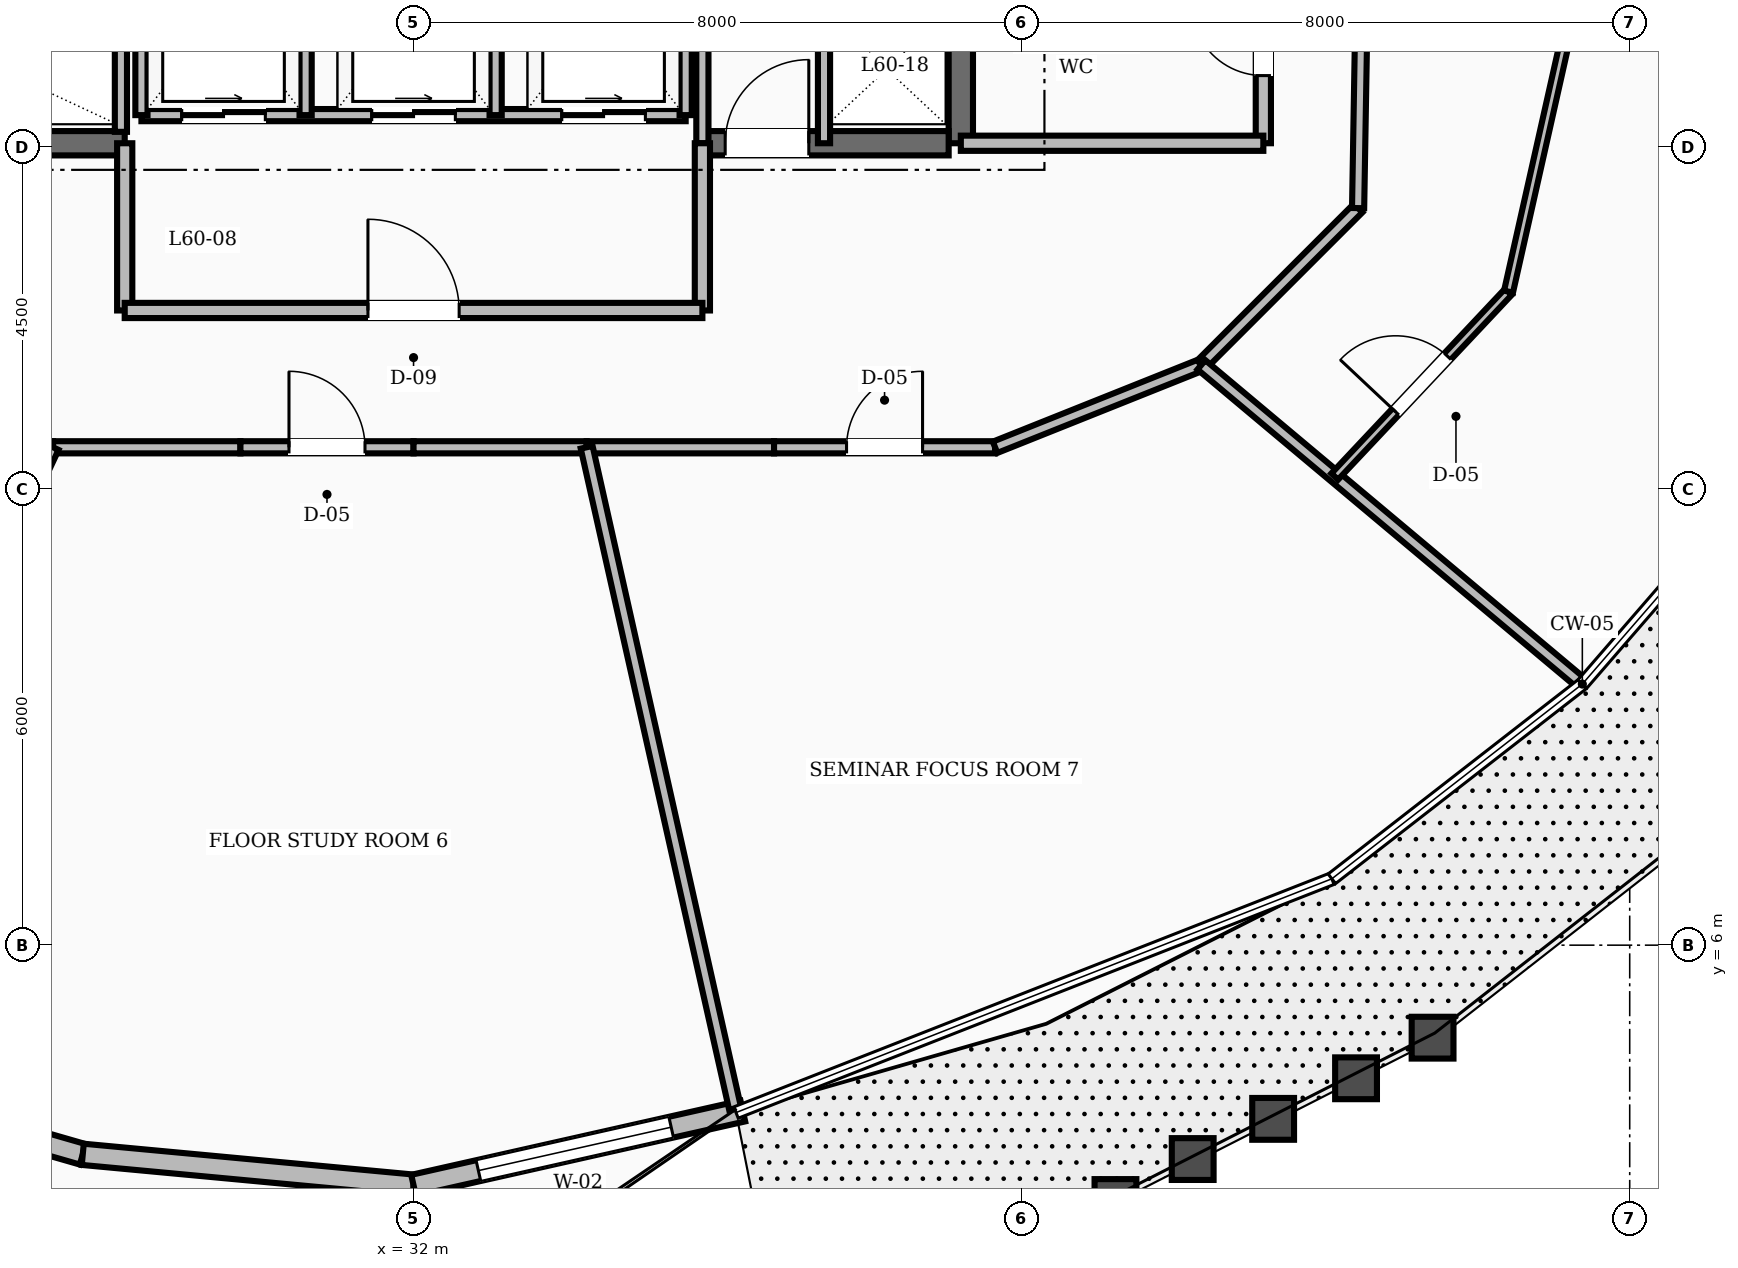
"""IFC4 building model, lengths in metres.
Left out: names, types, materials, properties, quantities, classifications, styles, units other than length and angle.
Written with IfcOpenShell. Run it as: python <this file> out.ifc"""

import sys

from ifc_helpers import new_model, si_unit, direction, frame, frame_2d, origin, place, context, subcontext, project, spatial, rectangle, extrude, element, fill, save


model = new_model("IFC4")
c1 = context("Model", 3, precision=1e-05, world=origin(), true_north=direction((0.0, 1.0)))
c2 = subcontext(c1, "Body", "Model", "MODEL_VIEW")
j1 = project(units=[si_unit("LENGTHUNIT", "METRE"), si_unit("PLANEANGLEUNIT", "RADIAN")], contexts=[c1])
p1 = place(None, origin())
s1 = spatial("IfcSite", under=j1, at=p1, CompositionType="ELEMENT")
p2 = place(p1, origin())
s2 = spatial("IfcBuilding", under=s1, at=p2, CompositionType="ELEMENT")
p3 = place(p2, frame((0.0, 0.0, 232.8)))
s3 = spatial("IfcBuildingStorey", under=s2, at=p3, CompositionType="ELEMENT", Elevation=232.8)
p4 = place(p3, frame((39.2, 16.55, 0.0), z_axis=(0.0, 0.0, 1.0), x_axis=(0.0, 1.0, 0.0)))
e1 = element("IfcWall", 1, at=p4, inside=s3, PredefinedType="SHEAR", context=c2, shape_type="SweptSolid", body=[
    extrude(rectangle(XDim=6.3, YDim=0.32, at=frame_2d((3.15, 0.0))), origin(), (0.0, 0.0, 1.0), 3.6),
])
p5 = place(p3, frame((24.96, 16.55, 0.0), z_axis=(0.0, 0.0, 1.0), x_axis=(1.0, 0.0, 0.0)))
e2 = element("IfcWall", 2, at=p5, inside=s3, PredefinedType="SHEAR", context=c2, shape_type="SweptSolid", body=[
    extrude(rectangle(XDim=3.24, YDim=0.32, at=frame_2d((1.62, 0.0))), origin(), (0.0, 0.0, 1.0), 3.6),
])
p6 = place(p3, frame((35.8, 16.55, 0.0), z_axis=(0.0, 0.0, 1.0), x_axis=(1.0, 0.0, 0.0)))
e3 = element("IfcWall", 3, at=p6, inside=s3, PredefinedType="SHEAR", context=c2, shape_type="SweptSolid", body=[
    extrude(rectangle(XDim=3.24, YDim=0.32, at=frame_2d((1.62, 0.0))), origin(), (0.0, 0.0, 1.0), 3.6),
])
p7 = place(p6, frame((0.3, 0.0, 0.0)))
e4 = element("IfcOpeningElement", 4, at=p7, cuts=e3, PredefinedType="OPENING", context=c2, shape_type="SweptSolid", body=[
    extrude(rectangle(XDim=1.1, YDim=2.1, at=frame_2d((0.55, 1.05))), frame((0.0, 0.17, 0.0), z_axis=(0.0, -1.0, 0.0), x_axis=(1.0, 0.0, 0.0)), (0.0, 0.0, 1.0), 0.34),
])
p8 = place(p3, frame((23.464, 4.452, 0.0), z_axis=(0.0, 0.0, 1.0), x_axis=(0.961001713186, -0.276542414927, 0.0)))
e5 = element("IfcWall", 5, at=p8, inside=s3, PredefinedType="STANDARD", context=c2, shape_type="SweptSolid", body=[
    extrude(rectangle(XDim=4.354, YDim=0.28, at=frame_2d((2.177, 0.0))), origin(), (0.0, 0.0, 1.0), 2.88),
])
p9 = place(p3, frame((27.648, 3.248, 0.0), z_axis=(0.0, 0.0, 1.0), x_axis=(0.995665801827, -0.093003285276, 0.0)))
e6 = element("IfcWall", 6, at=p9, inside=s3, PredefinedType="STANDARD", context=c2, shape_type="SweptSolid", body=[
    extrude(rectangle(XDim=4.371, YDim=0.28, at=frame_2d((2.186, 0.0))), origin(), (0.0, 0.0, 1.0), 2.88),
])
p10 = place(p3, frame((32.0, 2.842, 0.0), z_axis=(0.0, 0.0, 1.0), x_axis=(0.975546432827, 0.219793442572, 0.0)))
e7 = element("IfcWall", 7, at=p10, inside=s3, PredefinedType="STANDARD", context=c2, shape_type="SweptSolid", body=[
    extrude(rectangle(XDim=4.441, YDim=0.28, at=frame_2d((2.22, 0.0))), origin(), (0.0, 0.0, 1.0), 2.88),
])
p11 = place(p10, frame((0.875, 0.0, 0.8)))
e8 = element("IfcOpeningElement", 8, at=p11, cuts=e7, PredefinedType="OPENING", context=c2, shape_type="SweptSolid", body=[
    extrude(rectangle(XDim=2.6, YDim=1.65, at=frame_2d((1.3, 0.825))), frame((0.0, 0.15, 0.0), z_axis=(0.0, -1.0, 0.0), x_axis=(1.0, 0.0, 0.0)), (0.0, 0.0, 1.0), 0.3),
])
p12 = place(p3, frame((43.18, 16.55, 0.0), z_axis=(0.0, 0.0, 1.0), x_axis=(0.0, 1.0, 0.0)))
e9 = element("IfcWall", 9, at=p12, inside=s3, PredefinedType="SOLIDWALL", context=c2, shape_type="SweptSolid", body=[
    extrude(rectangle(XDim=2.73, YDim=0.2, at=frame_2d((1.365, 0.0))), origin(), (0.0, 0.0, 1.0), 2.87),
])
p13 = place(p12, frame((0.89, 0.0, 0.0)))
e10 = element("IfcOpeningElement", 10, at=p13, cuts=e9, PredefinedType="OPENING", context=c2, shape_type="SweptSolid", body=[
    extrude(rectangle(XDim=0.95, YDim=2.1, at=frame_2d((0.475, 1.05))), frame((0.0, 0.11, 0.0), z_axis=(0.0, -1.0, 0.0), x_axis=(1.0, 0.0, 0.0)), (0.0, 0.0, 1.0), 0.22),
])
p14 = place(p3, frame((39.2, 16.55, 0.0), z_axis=(0.0, 0.0, 1.0), x_axis=(1.0, 0.0, 0.0)))
e11 = element("IfcWall", 11, at=p14, inside=s3, PredefinedType="SOLIDWALL", context=c2, shape_type="SweptSolid", body=[
    extrude(rectangle(XDim=3.98, YDim=0.2, at=frame_2d((1.99, 0.0))), origin(), (0.0, 0.0, 1.0), 2.87),
])
p15 = place(p3, frame((35.8, 16.55, 0.0), z_axis=(0.0, 0.0, 1.0), x_axis=(0.0, 1.0, 0.0)))
e12 = element("IfcWall", 12, at=p15, inside=s3, PredefinedType="SOLIDWALL", context=c2, shape_type="SweptSolid", body=[
    extrude(rectangle(XDim=3.3, YDim=0.16, at=frame_2d((1.65, 0.0))), origin(), (0.0, 0.0, 1.0), 2.87),
])
p16 = place(p3, frame((37.4, 16.55, 0.0), z_axis=(0.0, 0.0, 1.0), x_axis=(0.0, 1.0, 0.0)))
e13 = element("IfcWall", 13, at=p16, inside=s3, PredefinedType="SOLIDWALL", context=c2, shape_type="SweptSolid", body=[
    extrude(rectangle(XDim=1.75, YDim=0.16, at=frame_2d((0.875, 0.0))), origin(), (0.0, 0.0, 1.0), 2.87),
])
for number, where, z_axis, x_axis in (
    (14, (28.2, 14.35, 0.0), (0.0, 0.0, 1.0), (0.0, 1.0, 0.0)),
    (15, (35.8, 14.35, 0.0), (0.0, 0.0, 1.0), (0.0, 1.0, 0.0)),
):
    element("IfcWall", number, at=place(p3, frame(where, z_axis=z_axis, x_axis=x_axis)), inside=s3, PredefinedType="SOLIDWALL", context=c2, shape_type="SweptSolid", body=[
        extrude(rectangle(XDim=2.2, YDim=0.2, at=frame_2d((1.1, 0.0))), origin(), (0.0, 0.0, 1.0), 2.87),
    ])
p17 = place(p3, frame((28.2, 14.35, 0.0), z_axis=(0.0, 0.0, 1.0), x_axis=(1.0, 0.0, 0.0)))
e16 = element("IfcWall", 16, at=p17, inside=s3, PredefinedType="SOLIDWALL", context=c2, shape_type="SweptSolid", body=[
    extrude(rectangle(XDim=7.6, YDim=0.2, at=frame_2d((3.8, 0.0))), origin(), (0.0, 0.0, 1.0), 2.87),
])
p18 = place(p17, frame((3.2, 0.0, 0.0)))
e17 = element("IfcOpeningElement", 17, at=p18, cuts=e16, PredefinedType="OPENING", context=c2, shape_type="SweptSolid", body=[
    extrude(rectangle(XDim=1.2, YDim=2.1, at=frame_2d((0.6, 1.05))), frame((0.0, 0.11, 0.0), z_axis=(0.0, -1.0, 0.0), x_axis=(1.0, 0.0, 0.0)), (0.0, 0.0, 1.0), 0.22),
])
p19 = place(p3, frame((28.42, 16.92, 0.0), z_axis=(0.0, 0.0, 1.0), x_axis=(1.0, 0.0, 0.0)))
e18 = element("IfcWall", 18, at=p19, inside=s3, PredefinedType="SOLIDWALL", context=c2, shape_type="SweptSolid", body=[
    extrude(rectangle(XDim=7.16, YDim=0.16, at=frame_2d((3.58, 0.0))), origin(), (0.0, 0.0, 1.0), 2.87),
])
p20 = place(p19, frame((0.53, 0.0, 0.0)))
e19 = element("IfcOpeningElement", 19, at=p20, cuts=e18, PredefinedType="OPENING", context=c2, shape_type="SweptSolid", body=[
    extrude(rectangle(XDim=1.1, YDim=2.15, at=frame_2d((0.55, 1.075))), frame((0.0, 0.09, 0.0), z_axis=(0.0, -1.0, 0.0), x_axis=(1.0, 0.0, 0.0)), (0.0, 0.0, 1.0), 0.18),
])
p21 = place(p19, frame((3.03, 0.0, 0.0)))
e20 = element("IfcOpeningElement", 20, at=p21, cuts=e18, PredefinedType="OPENING", context=c2, shape_type="SweptSolid", body=[
    extrude(rectangle(XDim=1.1, YDim=2.15, at=frame_2d((0.55, 1.075))), frame((0.0, 0.09, 0.0), z_axis=(0.0, -1.0, 0.0), x_axis=(1.0, 0.0, 0.0)), (0.0, 0.0, 1.0), 0.18),
])
p22 = place(p19, frame((5.53, 0.0, 0.0)))
e21 = element("IfcOpeningElement", 21, at=p22, cuts=e18, PredefinedType="OPENING", context=c2, shape_type="SweptSolid", body=[
    extrude(rectangle(XDim=1.1, YDim=2.15, at=frame_2d((0.55, 1.075))), frame((0.0, 0.09, 0.0), z_axis=(0.0, -1.0, 0.0), x_axis=(1.0, 0.0, 0.0)), (0.0, 0.0, 1.0), 0.18),
])
for number, where, z_axis, x_axis in (
    (22, (28.42, 16.92, 0.0), (0.0, 0.0, 1.0), (0.0, 1.0, 0.0)),
    (23, (30.58, 16.92, 0.0), (0.0, 0.0, 1.0), (0.0, 1.0, 0.0)),
    (24, (33.08, 16.92, 0.0), (0.0, 0.0, 1.0), (0.0, 1.0, 0.0)),
    (25, (35.58, 16.92, 0.0), (0.0, 0.0, 1.0), (0.0, 1.0, 0.0)),
):
    element("IfcWall", number, at=place(p3, frame(where, z_axis=z_axis, x_axis=x_axis)), inside=s3, PredefinedType="SOLIDWALL", context=c2, shape_type="SweptSolid", body=[
        extrude(rectangle(XDim=2.76, YDim=0.16, at=frame_2d((1.38, 0.0))), origin(), (0.0, 0.0, 1.0), 2.87),
    ])
p23 = place(p3, frame((28.15, 16.7, 0.0), z_axis=(0.0, 0.0, 1.0), x_axis=(0.0, 1.0, 0.0)))
e26 = element("IfcWall", 26, at=p23, inside=s3, PredefinedType="SOLIDWALL", context=c2, shape_type="SweptSolid", body=[
    extrude(rectangle(XDim=6.05, YDim=0.16, at=frame_2d((3.025, 0.0))), origin(), (0.0, 0.0, 1.0), 2.87),
])
p24 = place(p3, frame((24.349, 12.55, 0.0), z_axis=(0.0, 0.0, 1.0), x_axis=(1.0, 0.0, 0.0)))
e27 = element("IfcWall", 27, at=p24, inside=s3, PredefinedType="SOLIDWALL", context=c2, shape_type="SweptSolid", body=[
    extrude(rectangle(XDim=2.908, YDim=0.16, at=frame_2d((1.454, 0.0))), origin(), (0.0, 0.0, 1.0), 2.87),
])
p25 = place(p3, frame((27.257, 12.55, 0.0), z_axis=(0.0, 0.0, 1.0), x_axis=(1.0, 0.0, 0.0)))
e28 = element("IfcWall", 28, at=p25, inside=s3, PredefinedType="SOLIDWALL", context=c2, shape_type="SweptSolid", body=[
    extrude(rectangle(XDim=2.465, YDim=0.16, at=frame_2d((1.232, 0.0))), origin(), (0.0, 0.0, 1.0), 2.87),
])
p26 = place(p3, frame((29.722, 12.55, 0.0), z_axis=(0.0, 0.0, 1.0), x_axis=(1.0, 0.0, 0.0)))
e29 = element("IfcWall", 29, at=p26, inside=s3, PredefinedType="SOLIDWALL", context=c2, shape_type="SweptSolid", body=[
    extrude(rectangle(XDim=2.278, YDim=0.16, at=frame_2d((1.139, 0.0))), origin(), (0.0, 0.0, 1.0), 2.87),
])
p27 = place(p26, frame((0.639, 0.0, 0.0)))
e30 = element("IfcOpeningElement", 30, at=p27, cuts=e29, PredefinedType="OPENING", context=c2, shape_type="SweptSolid", body=[
    extrude(rectangle(XDim=1.0, YDim=2.1, at=frame_2d((0.5, 1.05))), frame((0.0, 0.09, 0.0), z_axis=(0.0, -1.0, 0.0), x_axis=(1.0, 0.0, 0.0)), (0.0, 0.0, 1.0), 0.18),
])
p28 = place(p3, frame((32.0, 12.55, 0.0), z_axis=(0.0, 0.0, 1.0), x_axis=(1.0, 0.0, 0.0)))
e31 = element("IfcWall", 31, at=p28, inside=s3, PredefinedType="SOLIDWALL", context=c2, shape_type="SweptSolid", body=[
    extrude(rectangle(XDim=2.278, YDim=0.16, at=frame_2d((1.139, 0.0))), origin(), (0.0, 0.0, 1.0), 2.87),
])
p29 = place(p3, frame((34.278, 12.55, 0.0), z_axis=(0.0, 0.0, 1.0), x_axis=(1.0, 0.0, 0.0)))
e32 = element("IfcWall", 32, at=p29, inside=s3, PredefinedType="SOLIDWALL", context=c2, shape_type="SweptSolid", body=[
    extrude(rectangle(XDim=2.465, YDim=0.16, at=frame_2d((1.232, 0.0))), origin(), (0.0, 0.0, 1.0), 2.87),
])
p30 = place(p3, frame((36.743, 12.55, 0.0), z_axis=(0.0, 0.0, 1.0), x_axis=(1.0, 0.0, 0.0)))
e33 = element("IfcWall", 33, at=p30, inside=s3, PredefinedType="SOLIDWALL", context=c2, shape_type="SweptSolid", body=[
    extrude(rectangle(XDim=2.908, YDim=0.16, at=frame_2d((1.454, 0.0))), origin(), (0.0, 0.0, 1.0), 2.87),
])
p31 = place(p30, frame((0.954, 0.0, 0.0)))
e34 = element("IfcOpeningElement", 34, at=p31, cuts=e33, PredefinedType="OPENING", context=c2, shape_type="SweptSolid", body=[
    extrude(rectangle(XDim=1.0, YDim=2.1, at=frame_2d((0.5, 1.05))), frame((0.0, 0.09, 0.0), z_axis=(0.0, -1.0, 0.0), x_axis=(1.0, 0.0, 0.0)), (0.0, 0.0, 1.0), 0.18),
])
p32 = place(p3, frame((39.651, 12.55, 0.0), z_axis=(0.0, 0.0, 1.0), x_axis=(0.92856882165, 0.371160266542, 0.0)))
e35 = element("IfcWall", 35, at=p32, inside=s3, PredefinedType="SOLIDWALL", context=c2, shape_type="SweptSolid", body=[
    extrude(rectangle(XDim=2.923, YDim=0.16, at=frame_2d((1.461, 0.0))), origin(), (0.0, 0.0, 1.0), 2.87),
])
p33 = place(p3, frame((42.365, 13.635, 0.0), z_axis=(0.0, 0.0, 1.0), x_axis=(0.707106781187, 0.707106781187, 0.0)))
e36 = element("IfcWall", 36, at=p33, inside=s3, PredefinedType="SOLIDWALL", context=c2, shape_type="SweptSolid", body=[
    extrude(rectangle(XDim=2.916, YDim=0.16, at=frame_2d((1.458, 0.0))), origin(), (0.0, 0.0, 1.0), 2.87),
])
p34 = place(p3, frame((44.427, 15.697, 0.0), z_axis=(0.0, 0.0, 1.0), x_axis=(0.016981035134, 0.999855811828, 0.0)))
e37 = element("IfcWall", 37, at=p34, inside=s3, PredefinedType="SOLIDWALL", context=c2, shape_type="SweptSolid", body=[
    extrude(rectangle(XDim=3.134, YDim=0.16, at=frame_2d((1.567, 0.0))), origin(), (0.0, 0.0, 1.0), 2.87),
])
p35 = place(p3, frame((42.365, 13.635, 0.0), z_axis=(0.0, 0.0, 1.0), x_axis=(0.766438880931, -0.642317243889, 0.0)))
e38 = element("IfcWall", 38, at=p35, inside=s3, PredefinedType="SOLIDWALL", context=c2, shape_type="SweptSolid", body=[
    extrude(rectangle(XDim=6.489, YDim=0.16, at=frame_2d((3.245, 0.0))), origin(), (0.0, 0.0, 1.0), 2.87),
])
p36 = place(p3, frame((44.119, 12.165, 0.0), z_axis=(0.0, 0.0, 1.0), x_axis=(0.684903797097, 0.728633507823, 0.0)))
e39 = element("IfcWall", 39, at=p36, inside=s3, PredefinedType="PARTITIONING", context=c2, shape_type="SweptSolid", body=[
    extrude(rectangle(XDim=3.339, YDim=0.12, at=frame_2d((1.669, 0.0))), origin(), (0.0, 0.0, 1.0), 2.87),
])
p37 = place(p36, frame((1.169, 0.0, 0.0)))
e40 = element("IfcOpeningElement", 40, at=p37, cuts=e39, PredefinedType="OPENING", context=c2, shape_type="SweptSolid", body=[
    extrude(rectangle(XDim=1.0, YDim=2.1, at=frame_2d((0.5, 1.05))), frame((0.0, 0.07, 0.0), z_axis=(0.0, -1.0, 0.0), x_axis=(1.0, 0.0, 0.0)), (0.0, 0.0, 1.0), 0.14),
])
p38 = place(p3, frame((46.406, 14.598, 0.0), z_axis=(0.0, 0.0, 1.0), x_axis=(0.219303315939, 0.975656730422, 0.0)))
e41 = element("IfcWall", 41, at=p38, inside=s3, PredefinedType="PARTITIONING", context=c2, shape_type="SweptSolid", body=[
    extrude(rectangle(XDim=3.365, YDim=0.12, at=frame_2d((1.683, 0.0))), origin(), (0.0, 0.0, 1.0), 2.87),
])
p39 = place(p3, frame((27.257, 12.55, 0.0), z_axis=(0.0, 0.0, 1.0), x_axis=(-0.424224240042, -0.905557173325, 0.0)))
e42 = element("IfcWall", 42, at=p39, inside=s3, PredefinedType="SOLIDWALL", context=c2, shape_type="SweptSolid", body=[
    extrude(rectangle(XDim=8.892, YDim=0.16, at=frame_2d((4.446, 0.0))), origin(), (0.0, 0.0, 1.0), 2.87),
])
p40 = place(p3, frame((34.278, 12.55, 0.0), z_axis=(0.0, 0.0, 1.0), x_axis=(0.219036747028, -0.975716610216, 0.0)))
e43 = element("IfcWall", 43, at=p40, inside=s3, PredefinedType="SOLIDWALL", context=c2, shape_type="SweptSolid", body=[
    extrude(rectangle(XDim=8.92, YDim=0.16, at=frame_2d((4.46, 0.0))), origin(), (0.0, 0.0, 1.0), 2.87),
])
p41 = place(p11, origin())
e44 = element("IfcWindow", 44, at=p41, inside=s3, PartitioningType="SINGLE_PANEL", PredefinedType="WINDOW", context=c2, shape_type="SweptSolid", body=[
    extrude(rectangle(XDim=2.6, YDim=1.65, at=frame_2d((1.3, 0.825))), frame((0.0, 0.03, 0.0), z_axis=(0.0, -1.0, 0.0), x_axis=(1.0, 0.0, 0.0)), (0.0, 0.0, 1.0), 0.06),
])
fill(e8, e44)
p42 = place(p13, origin())
e45 = element("IfcDoor", 45, at=p42, inside=s3, OperationType="SINGLE_SWING_RIGHT", PredefinedType="DOOR", context=c2, shape_type="SweptSolid", body=[
    extrude(rectangle(XDim=0.95, YDim=2.1, at=frame_2d((0.475, 1.05))), frame((0.0, 0.025, 0.0), z_axis=(0.0, -1.0, 0.0), x_axis=(1.0, 0.0, 0.0)), (0.0, 0.0, 1.0), 0.05),
])
fill(e10, e45)
p43 = place(p7, origin())
e46 = element("IfcDoor", 46, at=p43, inside=s3, OperationType="SINGLE_SWING_RIGHT", PredefinedType="DOOR", context=c2, shape_type="SweptSolid", body=[
    extrude(rectangle(XDim=1.1, YDim=2.1, at=frame_2d((0.55, 1.05))), frame((0.0, 0.025, 0.0), z_axis=(0.0, -1.0, 0.0), x_axis=(1.0, 0.0, 0.0)), (0.0, 0.0, 1.0), 0.05),
])
fill(e4, e46)
p44 = place(p18, origin())
e47 = element("IfcDoor", 47, at=p44, inside=s3, OperationType="SINGLE_SWING_LEFT", PredefinedType="DOOR", context=c2, shape_type="SweptSolid", body=[
    extrude(rectangle(XDim=1.2, YDim=2.1, at=frame_2d((0.6, 1.05))), frame((0.0, 0.025, 0.0), z_axis=(0.0, -1.0, 0.0), x_axis=(1.0, 0.0, 0.0)), (0.0, 0.0, 1.0), 0.05),
])
fill(e17, e47)
p45 = place(p20, origin())
e48 = element("IfcDoor", 48, at=p45, inside=s3, OperationType="SLIDING_TO_RIGHT", PredefinedType="DOOR", context=c2, shape_type="SweptSolid", body=[
    extrude(rectangle(XDim=1.1, YDim=2.15, at=frame_2d((0.55, 1.075))), frame((0.0, 0.025, 0.0), z_axis=(0.0, -1.0, 0.0), x_axis=(1.0, 0.0, 0.0)), (0.0, 0.0, 1.0), 0.05),
])
fill(e19, e48)
p46 = place(p21, origin())
e49 = element("IfcDoor", 49, at=p46, inside=s3, OperationType="SLIDING_TO_RIGHT", PredefinedType="DOOR", context=c2, shape_type="SweptSolid", body=[
    extrude(rectangle(XDim=1.1, YDim=2.15, at=frame_2d((0.55, 1.075))), frame((0.0, 0.025, 0.0), z_axis=(0.0, -1.0, 0.0), x_axis=(1.0, 0.0, 0.0)), (0.0, 0.0, 1.0), 0.05),
])
fill(e20, e49)
p47 = place(p22, origin())
e50 = element("IfcDoor", 50, at=p47, inside=s3, OperationType="SLIDING_TO_RIGHT", PredefinedType="DOOR", context=c2, shape_type="SweptSolid", body=[
    extrude(rectangle(XDim=1.1, YDim=2.15, at=frame_2d((0.55, 1.075))), frame((0.0, 0.025, 0.0), z_axis=(0.0, -1.0, 0.0), x_axis=(1.0, 0.0, 0.0)), (0.0, 0.0, 1.0), 0.05),
])
fill(e21, e50)
p48 = place(p37, origin())
e51 = element("IfcDoor", 51, at=p48, inside=s3, OperationType="SINGLE_SWING_LEFT", PredefinedType="DOOR", context=c2, shape_type="SweptSolid", body=[
    extrude(rectangle(XDim=1.0, YDim=2.1, at=frame_2d((0.5, 1.05))), frame((0.0, 0.025, 0.0), z_axis=(0.0, -1.0, 0.0), x_axis=(1.0, 0.0, 0.0)), (0.0, 0.0, 1.0), 0.05),
])
fill(e40, e51)
p49 = place(p27, origin())
e52 = element("IfcDoor", 52, at=p49, inside=s3, OperationType="SINGLE_SWING_LEFT", PredefinedType="DOOR", context=c2, shape_type="SweptSolid", body=[
    extrude(rectangle(XDim=1.0, YDim=2.1, at=frame_2d((0.5, 1.05))), frame((0.0, 0.025, 0.0), z_axis=(0.0, -1.0, 0.0), x_axis=(1.0, 0.0, 0.0)), (0.0, 0.0, 1.0), 0.05),
])
fill(e30, e52)
p50 = place(p31, origin())
e53 = element("IfcDoor", 53, at=p50, inside=s3, OperationType="SINGLE_SWING_RIGHT", PredefinedType="DOOR", context=c2, shape_type="SweptSolid", body=[
    extrude(rectangle(XDim=1.0, YDim=2.1, at=frame_2d((0.5, 1.05))), frame((0.0, 0.025, 0.0), z_axis=(0.0, -1.0, 0.0), x_axis=(1.0, 0.0, 0.0)), (0.0, 0.0, 1.0), 0.05),
])
fill(e34, e53)
save(model, sys.argv[1])
